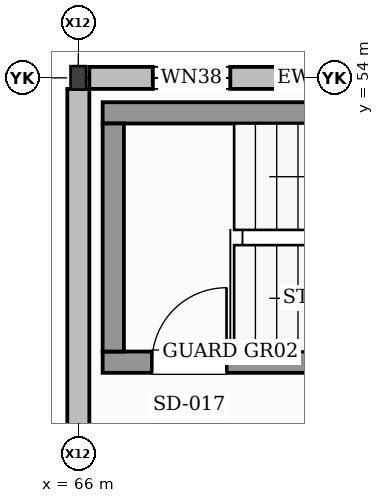
"""IFC4 building model, lengths in metres.
Left out: names, types, materials, properties, quantities, classifications, styles, units other than length and angle.
Written with IfcOpenShell. Run it as: python <this file> out.ifc"""

import sys

from ifc_helpers import new_model, si_unit, direction, frame, frame_2d, origin, origin_2d, place, context, subcontext, project, spatial, rectangle, i_section, extrude, element, fill, save


model = new_model("IFC4")
c1 = context("Model", 3, precision=1e-05, world=origin(), true_north=direction((0.0, 1.0)))
c2 = subcontext(c1, "Body", "Model", "MODEL_VIEW")
j1 = project(units=[si_unit("LENGTHUNIT", "METRE"), si_unit("PLANEANGLEUNIT", "RADIAN")], contexts=[c1])
p1 = place(None, origin())
s1 = spatial("IfcSite", under=j1, at=p1, CompositionType="ELEMENT")
p2 = place(p1, origin())
s2 = spatial("IfcBuilding", under=s1, at=p2, CompositionType="ELEMENT")
p3 = place(p2, frame((0.0, 0.0, 10.0)))
s3 = spatial("IfcBuildingStorey", under=s2, at=p3, CompositionType="ELEMENT", Elevation=10.0)
p4 = place(p3, frame((66.0, 54.0, 0.0), z_axis=(0.0, 0.0, 1.0), x_axis=(1.0, 0.0, 0.0)))
e1 = element("IfcColumn", 1, at=p4, inside=s3, PredefinedType="COLUMN", context=c2, shape_type="SweptSolid", body=[
    extrude(i_section(OverallWidth=0.205, OverallDepth=0.31, WebThickness=0.01, FlangeThickness=0.016, at=origin_2d()), origin(), (0.0, 0.0, 1.0), 4.0),
])
p5 = place(p3, frame((71.855, 54.0, 0.0), z_axis=(0.0, 0.0, 1.0), x_axis=(-1.0, 0.0, 0.0)))
e2 = element("IfcWall", 2, at=p5, inside=s3, PredefinedType="STANDARD", context=c2, shape_type="SweptSolid", body=[
    extrude(rectangle(XDim=5.71, YDim=0.29, at=frame_2d((2.855, 0.0))), origin(), (0.0, 0.0, 1.0), 4.0),
])
p6 = place(p5, frame((0.607, 0.0, 0.96)))
e3 = element("IfcOpeningElement", 3, at=p6, cuts=e2, PredefinedType="OPENING", context=c2, shape_type="SweptSolid", body=[
    extrude(rectangle(XDim=1.5, YDim=1.5, at=frame_2d((0.75, 0.75))), frame((0.0, 0.155, 0.0), z_axis=(0.0, -1.0, 0.0), x_axis=(1.0, 0.0, 0.0)), (0.0, 0.0, 1.0), 0.31),
])
p7 = place(p5, frame((3.855, 0.0, 0.86)))
e4 = element("IfcOpeningElement", 4, at=p7, cuts=e2, PredefinedType="OPENING", context=c2, shape_type="SweptSolid", body=[
    extrude(rectangle(XDim=1.02, YDim=1.02, at=frame_2d((0.51, 0.51))), frame((0.0, 0.155, 0.0), z_axis=(0.0, -1.0, 0.0), x_axis=(1.0, 0.0, 0.0)), (0.0, 0.0, 1.0), 0.31),
])
p8 = place(p3, frame((66.0, 53.855, 0.0), z_axis=(0.0, 0.0, 1.0), x_axis=(0.0, -1.0, 0.0)))
e5 = element("IfcWall", 5, at=p8, inside=s3, PredefinedType="STANDARD", context=c2, shape_type="SweptSolid", body=[
    extrude(rectangle(XDim=5.71, YDim=0.29, at=frame_2d((2.855, 0.0))), origin(), (0.0, 0.0, 1.0), 1.391),
])
p9 = place(p2, frame((0.0, 0.0, 25.2)))
s4 = spatial("IfcBuildingStorey", under=s2, at=p9, CompositionType="ELEMENT", Elevation=25.2)
p10 = place(p9, frame((65.955, 54.0, -15.2), z_axis=(0.0, 0.0, 1.0), x_axis=(-1.0, 0.0, 0.0)))
e6 = element("IfcWall", 6, at=p10, inside=s4, PredefinedType="STANDARD", context=c2, shape_type="SweptSolid", body=[
    extrude(rectangle(XDim=1.182, YDim=0.265, at=frame_2d((0.591, 0.0))), origin(), (0.0, 0.0, 1.0), 2.014),
])
p11 = place(p3, frame((66.32, 50.26, 0.0), z_axis=(0.0, 0.0, 1.0), x_axis=(1.0, 0.0, 0.0)))
e7 = element("IfcWall", 7, at=p11, inside=s3, PredefinedType="SHEAR", context=c2, shape_type="SweptSolid", body=[
    extrude(rectangle(XDim=8.16, YDim=0.28, at=frame_2d((4.08, 0.0))), origin(), (0.0, 0.0, 1.0), 3.75),
])
p12 = place(p11, frame((0.65, 0.0, 0.0)))
e8 = element("IfcOpeningElement", 8, at=p12, cuts=e7, PredefinedType="OPENING", context=c2, shape_type="SweptSolid", body=[
    extrude(rectangle(XDim=0.98, YDim=2.15, at=frame_2d((0.49, 1.075))), frame((0.0, 0.15, 0.0), z_axis=(0.0, -1.0, 0.0), x_axis=(1.0, 0.0, 0.0)), (0.0, 0.0, 1.0), 0.3),
])
p13 = place(p3, frame((74.48, 53.54, 0.0), z_axis=(0.0, 0.0, 1.0), x_axis=(-1.0, 0.0, 0.0)))
e9 = element("IfcWall", 9, at=p13, inside=s3, PredefinedType="SHEAR", context=c2, shape_type="SweptSolid", body=[
    extrude(rectangle(XDim=8.16, YDim=0.28, at=frame_2d((4.08, 0.0))), origin(), (0.0, 0.0, 1.0), 3.75),
])
p14 = place(p3, frame((66.46, 53.4, 0.0), z_axis=(0.0, 0.0, 1.0), x_axis=(0.0, -1.0, 0.0)))
e10 = element("IfcWall", 10, at=p14, inside=s3, PredefinedType="SHEAR", context=c2, shape_type="SweptSolid", body=[
    extrude(rectangle(XDim=3.0, YDim=0.28, at=frame_2d((1.5, 0.0))), origin(), (0.0, 0.0, 1.0), 3.75),
])
p15 = place(p7, origin())
e11 = element("IfcWindow", 11, at=p15, inside=s3, PartitioningType="SINGLE_PANEL", PredefinedType="WINDOW", context=c2, shape_type="SweptSolid", body=[
    extrude(rectangle(XDim=1.02, YDim=1.02, at=frame_2d((0.51, 0.51))), frame((0.0, 0.03, 0.0), z_axis=(0.0, -1.0, 0.0), x_axis=(1.0, 0.0, 0.0)), (0.0, 0.0, 1.0), 0.06),
])
fill(e4, e11)
p16 = place(p12, origin())
e12 = element("IfcDoor", 12, at=p16, inside=s3, OperationType="SINGLE_SWING_RIGHT", PredefinedType="DOOR", context=c2, shape_type="SweptSolid", body=[
    extrude(rectangle(XDim=0.98, YDim=2.15, at=frame_2d((0.49, 1.075))), frame((0.0, 0.025, 0.0), z_axis=(0.0, -1.0, 0.0), x_axis=(1.0, 0.0, 0.0)), (0.0, 0.0, 1.0), 0.05),
])
fill(e8, e12)
save(model, sys.argv[1])
